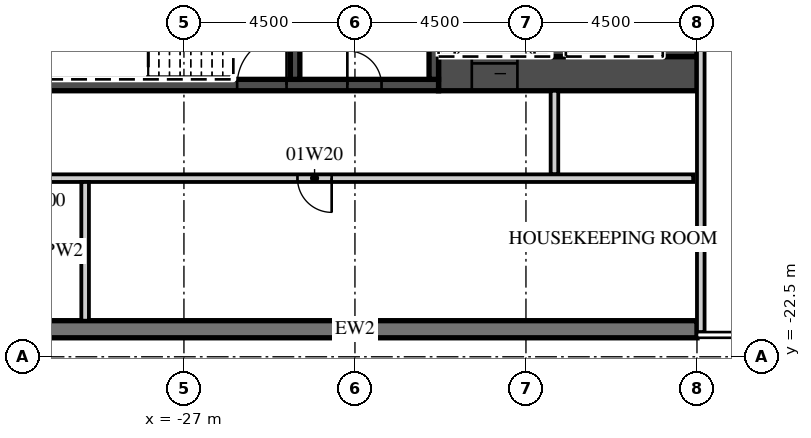
"""IFC4 building model, lengths in metres.
Left out: names, types, materials, properties, quantities, classifications, styles, units other than length and angle.
Written with IfcOpenShell. Run it as: python <this file> out.ifc"""

import sys

from ifc_helpers import new_model, si_unit, direction, frame, frame_2d, origin, place, context, subcontext, project, spatial, rectangle, extrude, element, fill, save


model = new_model("IFC4")
c1 = context("Model", 3, precision=1e-05, world=origin(), true_north=direction((0.0, 1.0)))
c2 = subcontext(c1, "Body", "Model", "MODEL_VIEW")
j1 = project(units=[si_unit("LENGTHUNIT", "METRE"), si_unit("PLANEANGLEUNIT", "RADIAN")], contexts=[c1])
p1 = place(None, origin())
s1 = spatial("IfcSite", under=j1, at=p1, CompositionType="ELEMENT")
p2 = place(p1, origin())
s2 = spatial("IfcBuilding", under=s1, at=p2, CompositionType="ELEMENT")
p3 = place(p2, frame((0.0, 0.0, 11.0)))
s3 = spatial("IfcBuildingStorey", under=s2, at=p3, CompositionType="ELEMENT", Elevation=11.0)
p4 = place(p3, frame((-31.5, -21.775, 0.0), z_axis=(0.0, 0.0, 1.0), x_axis=(1.0, 0.0, 0.0)))
e1 = element("IfcWall", 1, at=p4, inside=s3, PredefinedType="SOLIDWALL", context=c2, shape_type="SweptSolid", body=[
    extrude(rectangle(XDim=18.0, YDim=0.45, at=frame_2d((9.0, 0.0))), origin(), (0.0, 0.0, 1.0), 5.55),
])
p5 = place(p3, frame((-20.3, -15.05, 0.0), z_axis=(0.0, 0.0, 1.0), x_axis=(1.0, 0.0, 0.0)))
e2 = element("IfcWall", 2, at=p5, inside=s3, PredefinedType="SHEAR", context=c2, shape_type="SweptSolid", body=[
    extrude(rectangle(XDim=6.8, YDim=0.9, at=frame_2d((3.4, 0.0))), origin(), (0.0, 0.0, 1.0), 5.55),
])
p6 = place(p5, frame((0.875, 0.0, 0.0)))
e3 = element("IfcOpeningElement", 3, at=p6, cuts=e2, PredefinedType="OPENING", context=c2, shape_type="SweptSolid", body=[
    extrude(rectangle(XDim=1.2, YDim=2.1, at=frame_2d((0.6, 1.05))), frame((0.0, 0.46, 0.0), z_axis=(0.0, -1.0, 0.0), x_axis=(1.0, 0.0, 0.0)), (0.0, 0.0, 1.0), 0.92),
])
p7 = place(p3, frame((-30.6, -15.35, 0.0), z_axis=(0.0, 0.0, 1.0), x_axis=(1.0, 0.0, 0.0)))
e4 = element("IfcWall", 4, at=p7, inside=s3, PredefinedType="SHEAR", context=c2, shape_type="SweptSolid", body=[
    extrude(rectangle(XDim=10.3, YDim=0.3, at=frame_2d((5.15, 0.0))), origin(), (0.0, 0.0, 1.0), 5.55),
])
p8 = place(p7, frame((5.0, 0.0, 0.0)))
e5 = element("IfcOpeningElement", 5, at=p8, cuts=e4, PredefinedType="OPENING", context=c2, shape_type="SweptSolid", body=[
    extrude(rectangle(XDim=1.3, YDim=2.1, at=frame_2d((0.65, 1.05))), frame((0.0, 0.16, 0.0), z_axis=(0.0, -1.0, 0.0), x_axis=(1.0, 0.0, 0.0)), (0.0, 0.0, 1.0), 0.32),
])
p9 = place(p7, frame((7.9, 0.0, 0.0)))
e6 = element("IfcOpeningElement", 6, at=p9, cuts=e4, PredefinedType="OPENING", context=c2, shape_type="SweptSolid", body=[
    extrude(rectangle(XDim=0.9, YDim=2.1, at=frame_2d((0.45, 1.05))), frame((0.0, 0.16, 0.0), z_axis=(0.0, -1.0, 0.0), x_axis=(1.0, 0.0, 0.0)), (0.0, 0.0, 1.0), 0.32),
])
p10 = place(p3, frame((-13.95, -14.6, 0.0), z_axis=(0.0, 0.0, 1.0), x_axis=(0.0, 1.0, 0.0)))
e7 = element("IfcWall", 7, at=p10, inside=s3, PredefinedType="SHEAR", context=c2, shape_type="SweptSolid", body=[
    extrude(rectangle(XDim=12.2, YDim=0.9, at=frame_2d((6.1, 0.0))), origin(), (0.0, 0.0, 1.0), 5.55),
])
p11 = place(p3, frame((-17.15, -14.6, 0.0), z_axis=(0.0, 0.0, 1.0), x_axis=(0.0, 1.0, 0.0)))
e8 = element("IfcWall", 8, at=p11, inside=s3, PredefinedType="SHEAR", context=c2, shape_type="SweptSolid", body=[
    extrude(rectangle(XDim=5.8, YDim=0.4, at=frame_2d((2.9, 0.0))), origin(), (0.0, 0.0, 1.0), 5.55),
])
for number, where, z_axis, x_axis in (
    (9, (-20.425, -15.2, 0.0), (0.0, 0.0, 1.0), (0.0, 1.0, 0.0)),
    (10, (-24.075, -15.2, 0.0), (0.0, 0.0, 1.0), (0.0, 1.0, 0.0)),
):
    element("IfcWall", number, at=place(p3, frame(where, z_axis=z_axis, x_axis=x_axis)), inside=s3, PredefinedType="SHEAR", context=c2, shape_type="SweptSolid", body=[
        extrude(rectangle(XDim=3.25, YDim=0.25, at=frame_2d((1.625, 0.0))), origin(), (0.0, 0.0, 1.0), 5.55),
    ])
p12 = place(p3, frame((-17.25, -17.7, 0.0), z_axis=(0.0, 0.0, 1.0), x_axis=(0.0, 1.0, 0.0)))
e11 = element("IfcWall", 11, at=p12, inside=s3, PredefinedType="PARTITIONING", context=c2, shape_type="SweptSolid", body=[
    extrude(rectangle(XDim=2.2, YDim=0.2, at=frame_2d((1.1, 0.0))), origin(), (0.0, 0.0, 1.0), 5.55),
])
p13 = place(p3, frame((-44.55, -17.8, 0.0), z_axis=(0.0, 0.0, 1.0), x_axis=(1.0, 0.0, 0.0)))
e12 = element("IfcWall", 12, at=p13, inside=s3, PredefinedType="PARTITIONING", context=c2, shape_type="SweptSolid", body=[
    extrude(rectangle(XDim=30.95, YDim=0.2, at=frame_2d((15.475, 0.0))), origin(), (0.0, 0.0, 1.0), 5.55),
])
p14 = place(p13, frame((12.238, 0.0, 0.0)))
e13 = element("IfcOpeningElement", 13, at=p14, cuts=e12, PredefinedType="OPENING", context=c2, shape_type="SweptSolid", body=[
    extrude(rectangle(XDim=0.9, YDim=2.1, at=frame_2d((0.45, 1.05))), frame((0.0, 0.11, 0.0), z_axis=(0.0, -1.0, 0.0), x_axis=(1.0, 0.0, 0.0)), (0.0, 0.0, 1.0), 0.22),
])
p15 = place(p13, frame((20.538, 0.0, 0.0)))
e14 = element("IfcOpeningElement", 14, at=p15, cuts=e12, PredefinedType="OPENING", context=c2, shape_type="SweptSolid", body=[
    extrude(rectangle(XDim=0.9, YDim=2.1, at=frame_2d((0.45, 1.05))), frame((0.0, 0.11, 0.0), z_axis=(0.0, -1.0, 0.0), x_axis=(1.0, 0.0, 0.0)), (0.0, 0.0, 1.0), 0.22),
])
p16 = place(p3, frame((-29.6, -21.55, 0.0), z_axis=(0.0, 0.0, 1.0), x_axis=(0.0, 1.0, 0.0)))
e15 = element("IfcWall", 15, at=p16, inside=s3, PredefinedType="PARTITIONING", context=c2, shape_type="SweptSolid", body=[
    extrude(rectangle(XDim=3.65, YDim=0.2, at=frame_2d((1.825, 0.0))), origin(), (0.0, 0.0, 1.0), 5.55),
])
p17 = place(p3, frame((-13.4, -21.85, 0.0), z_axis=(0.0, 0.0, 1.0), x_axis=(0.0, 1.0, 0.0)))
e16 = element("IfcWall", 16, at=p17, inside=s3, PredefinedType="PARTITIONING", context=c2, shape_type="SweptSolid", body=[
    extrude(rectangle(XDim=20.15, YDim=0.2, at=frame_2d((10.075, 0.0))), origin(), (0.0, 0.0, 1.0), 5.55),
])
p18 = place(p6, origin())
e17 = element("IfcDoor", 17, at=p18, inside=s3, OperationType="SLIDING_TO_LEFT", PredefinedType="DOOR", context=c2, shape_type="SweptSolid", body=[
    extrude(rectangle(XDim=1.2, YDim=2.1, at=frame_2d((0.6, 1.05))), frame((0.0, 0.025, 0.0), z_axis=(0.0, -1.0, 0.0), x_axis=(1.0, 0.0, 0.0)), (0.0, 0.0, 1.0), 0.05),
])
fill(e3, e17)
p19 = place(p8, origin())
e18 = element("IfcDoor", 18, at=p19, inside=s3, OperationType="SINGLE_SWING_RIGHT", PredefinedType="DOOR", context=c2, shape_type="SweptSolid", body=[
    extrude(rectangle(XDim=1.3, YDim=2.1, at=frame_2d((0.65, 1.05))), frame((0.0, 0.025, 0.0), z_axis=(0.0, -1.0, 0.0), x_axis=(1.0, 0.0, 0.0)), (0.0, 0.0, 1.0), 0.05),
])
fill(e5, e18)
p20 = place(p9, origin())
e19 = element("IfcDoor", 19, at=p20, inside=s3, OperationType="SINGLE_SWING_LEFT", PredefinedType="DOOR", context=c2, shape_type="SweptSolid", body=[
    extrude(rectangle(XDim=0.9, YDim=2.1, at=frame_2d((0.45, 1.05))), frame((0.0, 0.025, 0.0), z_axis=(0.0, -1.0, 0.0), x_axis=(1.0, 0.0, 0.0)), (0.0, 0.0, 1.0), 0.05),
])
fill(e6, e19)
p21 = place(p15, origin())
e20 = element("IfcDoor", 20, at=p21, inside=s3, OperationType="SINGLE_SWING_RIGHT", PredefinedType="DOOR", context=c2, shape_type="SweptSolid", body=[
    extrude(rectangle(XDim=0.9, YDim=2.1, at=frame_2d((0.45, 1.05))), frame((0.0, 0.025, 0.0), z_axis=(0.0, -1.0, 0.0), x_axis=(1.0, 0.0, 0.0)), (0.0, 0.0, 1.0), 0.05),
])
fill(e14, e20)
save(model, sys.argv[1])
